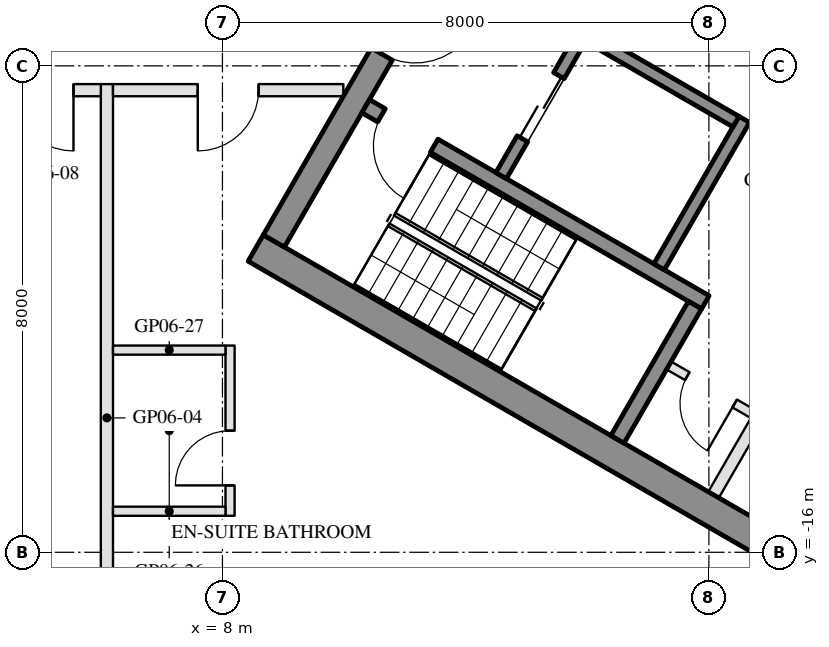
"""IFC4 building model, lengths in metres.
Left out: names, types, materials, properties, quantities, classifications, styles, units other than length and angle.
Written with IfcOpenShell. Run it as: python <this file> out.ifc"""

import sys

from ifc_helpers import new_model, si_unit, direction, frame, frame_2d, origin, place, context, subcontext, project, spatial, rectangle, extrude, element, fill, save


model = new_model("IFC4")
c1 = context("Model", 3, precision=1e-05, world=origin(), true_north=direction((0.0, 1.0)))
c2 = subcontext(c1, "Body", "Model", "MODEL_VIEW")
j1 = project(units=[si_unit("LENGTHUNIT", "METRE"), si_unit("PLANEANGLEUNIT", "RADIAN")], contexts=[c1])
p1 = place(None, origin())
s1 = spatial("IfcSite", under=j1, at=p1, CompositionType="ELEMENT")
p2 = place(p1, origin())
s2 = spatial("IfcBuilding", under=s1, at=p2, CompositionType="ELEMENT")
p3 = place(p2, frame((0.0, 0.0, 90.9)))
s3 = spatial("IfcBuildingStorey", under=s2, at=p3, CompositionType="ELEMENT", Elevation=90.9)
for number, where, z_axis, x_axis in (
    (1, (8.547, -10.997, 0.0), (0.0, 0.0, 1.0), (0.866, -0.5, 0.0)),
    (2, (13.797, -1.903, 0.0), (0.0, 0.0, 1.0), (0.866, -0.5, 0.0)),
):
    element("IfcWall", number, at=place(p3, frame(where, z_axis=z_axis, x_axis=x_axis)), inside=s3, PredefinedType="SHEAR", context=c2, shape_type="SweptSolid", body=[
        extrude(rectangle(XDim=14.837, YDim=0.5, at=frame_2d((7.418, 0.0))), origin(), (0.0, 0.0, 1.0), 3.5),
    ])
p4 = place(p3, frame((8.845, -10.88, 0.0), z_axis=(0.0, 0.0, 1.0), x_axis=(0.500004234368, 0.866022959057, 0.0)))
e3 = element("IfcWall", 3, at=p4, inside=s3, PredefinedType="SHEAR", context=c2, shape_type="SweptSolid", body=[
    extrude(rectangle(XDim=10.0, YDim=0.4, at=frame_2d((5.0, 0.0))), origin(), (0.0, 0.0, 1.0), 3.5),
])
p5 = place(p4, frame((3.55, 0.0, 0.0)))
e4 = element("IfcOpeningElement", 4, at=p5, cuts=e3, PredefinedType="OPENING", context=c2, shape_type="SweptSolid", body=[
    extrude(rectangle(XDim=1.1, YDim=2.1, at=frame_2d((0.55, 1.05))), frame((0.0, 0.21, 0.0), z_axis=(0.0, -1.0, 0.0), x_axis=(1.0, 0.0, 0.0)), (0.0, 0.0, 1.0), 0.42),
])
p6 = place(p4, frame((5.85, 0.0, 0.0)))
e5 = element("IfcOpeningElement", 5, at=p6, cuts=e3, PredefinedType="OPENING", context=c2, shape_type="SweptSolid", body=[
    extrude(rectangle(XDim=1.4, YDim=2.1, at=frame_2d((0.7, 1.05))), frame((0.0, 0.21, 0.0), z_axis=(0.0, -1.0, 0.0), x_axis=(1.0, 0.0, 0.0)), (0.0, 0.0, 1.0), 0.42),
])
p7 = place(p3, frame((10.356, -8.664, 0.0), z_axis=(0.0, 0.0, 1.0), x_axis=(0.866028629588, -0.499994412703, 0.0)))
e6 = element("IfcWall", 6, at=p7, inside=s3, PredefinedType="SHEAR", context=c2, shape_type="SweptSolid", body=[
    extrude(rectangle(XDim=6.45, YDim=0.25, at=frame_2d((3.225, 0.0))), origin(), (0.0, 0.0, 1.0), 3.5),
])
p8 = place(p7, frame((0.3, 0.0, 0.0)))
e7 = element("IfcOpeningElement", 7, at=p8, cuts=e6, PredefinedType="OPENING", context=c2, shape_type="SweptSolid", body=[
    extrude(rectangle(XDim=1.0, YDim=2.1, at=frame_2d((0.5, 1.05))), frame((0.0, 0.135, 0.0), z_axis=(0.0, -1.0, 0.0), x_axis=(1.0, 0.0, 0.0)), (0.0, 0.0, 1.0), 0.27),
])
p9 = place(p3, frame((14.496, -14.143, 0.0), z_axis=(0.0, 0.0, 1.0), x_axis=(0.500062241894, 0.865989465428, 0.0)))
e8 = element("IfcWall", 8, at=p9, inside=s3, PredefinedType="SHEAR", context=c2, shape_type="SweptSolid", body=[
    extrude(rectangle(XDim=2.55, YDim=0.25, at=frame_2d((1.275, 0.0))), origin(), (0.0, 0.0, 1.0), 3.5),
])
p10 = place(p3, frame((15.181, -11.305, 0.0), z_axis=(0.0, 0.0, 1.0), x_axis=(0.49994636267, 0.866056369097, 0.0)))
e9 = element("IfcWall", 9, at=p10, inside=s3, PredefinedType="SHEAR", context=c2, shape_type="SweptSolid", body=[
    extrude(rectangle(XDim=2.8, YDim=0.2, at=frame_2d((1.4, 0.0))), origin(), (0.0, 0.0, 1.0), 3.5),
])
p11 = place(p3, frame((12.583, -9.805, 0.0), z_axis=(0.0, 0.0, 1.0), x_axis=(0.49994636267, 0.866056369097, 0.0)))
e10 = element("IfcWall", 10, at=p11, inside=s3, PredefinedType="SHEAR", context=c2, shape_type="SweptSolid", body=[
    extrude(rectangle(XDim=2.8, YDim=0.2, at=frame_2d((1.4, 0.0))), origin(), (0.0, 0.0, 1.0), 3.5),
])
p12 = place(p11, frame((0.7, 0.0, 0.0)))
e11 = element("IfcOpeningElement", 11, at=p12, cuts=e10, PredefinedType="OPENING", context=c2, shape_type="SweptSolid", body=[
    extrude(rectangle(XDim=1.2, YDim=2.1, at=frame_2d((0.6, 1.05))), frame((0.0, 0.11, 0.0), z_axis=(0.0, -1.0, 0.0), x_axis=(1.0, 0.0, 0.0)), (0.0, 0.0, 1.0), 0.22),
])
p13 = place(p3, frame((14.02, -7.517, 0.0), z_axis=(0.0, 0.0, 1.0), x_axis=(0.866034573852, -0.49998411664, 0.0)))
e12 = element("IfcWall", 12, at=p13, inside=s3, PredefinedType="SHEAR", context=c2, shape_type="SweptSolid", body=[
    extrude(rectangle(XDim=2.8, YDim=0.2, at=frame_2d((1.4, 0.0))), origin(), (0.0, 0.0, 1.0), 3.5),
])
p14 = place(p3, frame((12.968, -4.138, 0.0), z_axis=(0.0, 0.0, 1.0), x_axis=(0.866028328073, -0.49999493495, 0.0)))
e13 = element("IfcWall", 13, at=p14, inside=s3, PredefinedType="SHEAR", context=c2, shape_type="SweptSolid", body=[
    extrude(rectangle(XDim=10.16, YDim=0.2, at=frame_2d((5.08, 0.0))), origin(), (0.0, 0.0, 1.0), 3.5),
])
p15 = place(p14, frame((0.62, 0.0, 0.0)))
e14 = element("IfcOpeningElement", 14, at=p15, cuts=e13, PredefinedType="OPENING", context=c2, shape_type="SweptSolid", body=[
    extrude(rectangle(XDim=1.1, YDim=2.1, at=frame_2d((0.55, 1.05))), frame((0.0, 0.11, 0.0), z_axis=(0.0, -1.0, 0.0), x_axis=(1.0, 0.0, 0.0)), (0.0, 0.0, 1.0), 0.22),
])
p16 = place(p14, frame((3.16, 0.0, 0.0)))
e15 = element("IfcOpeningElement", 15, at=p16, cuts=e13, PredefinedType="OPENING", context=c2, shape_type="SweptSolid", body=[
    extrude(rectangle(XDim=1.1, YDim=2.1, at=frame_2d((0.55, 1.05))), frame((0.0, 0.11, 0.0), z_axis=(0.0, -1.0, 0.0), x_axis=(1.0, 0.0, 0.0)), (0.0, 0.0, 1.0), 0.22),
])
p17 = place(p14, frame((5.7, 0.0, 0.0)))
e16 = element("IfcOpeningElement", 16, at=p17, cuts=e13, PredefinedType="OPENING", context=c2, shape_type="SweptSolid", body=[
    extrude(rectangle(XDim=1.1, YDim=2.1, at=frame_2d((0.55, 1.05))), frame((0.0, 0.11, 0.0), z_axis=(0.0, -1.0, 0.0), x_axis=(1.0, 0.0, 0.0)), (0.0, 0.0, 1.0), 0.22),
])
p18 = place(p14, frame((8.24, 0.0, 0.0)))
e17 = element("IfcOpeningElement", 17, at=p18, cuts=e13, PredefinedType="OPENING", context=c2, shape_type="SweptSolid", body=[
    extrude(rectangle(XDim=1.1, YDim=2.1, at=frame_2d((0.55, 1.05))), frame((0.0, 0.11, 0.0), z_axis=(0.0, -1.0, 0.0), x_axis=(1.0, 0.0, 0.0)), (0.0, 0.0, 1.0), 0.22),
])
p19 = place(p3, frame((16.076, -15.055, 0.0), z_axis=(0.0, 0.0, 1.0), x_axis=(0.499995103361, 0.866028230842, 0.0)))
e18 = element("IfcWall", 18, at=p19, inside=s3, PredefinedType="PARTITIONING", context=c2, shape_type="SweptSolid", body=[
    extrude(rectangle(XDim=5.4, YDim=0.2, at=frame_2d((2.7, 0.0))), origin(), (0.0, 0.0, 1.0), 3.5),
])
p20 = place(p19, frame((1.913, 0.0, 0.0)))
e19 = element("IfcOpeningElement", 19, at=p20, cuts=e18, PredefinedType="OPENING", context=c2, shape_type="SweptSolid", body=[
    extrude(rectangle(XDim=0.9, YDim=2.1, at=frame_2d((0.45, 1.05))), frame((0.0, 0.11, 0.0), z_axis=(0.0, -1.0, 0.0), x_axis=(1.0, 0.0, 0.0)), (0.0, 0.0, 1.0), 0.22),
])
p21 = place(p19, frame((3.788, 0.0, 0.0)))
e20 = element("IfcOpeningElement", 20, at=p21, cuts=e18, PredefinedType="OPENING", context=c2, shape_type="SweptSolid", body=[
    extrude(rectangle(XDim=0.9, YDim=2.1, at=frame_2d((0.45, 1.05))), frame((0.0, 0.11, 0.0), z_axis=(0.0, -1.0, 0.0), x_axis=(1.0, 0.0, 0.0)), (0.0, 0.0, 1.0), 0.22),
])
p22 = place(p3, frame((15.342, -12.928, 0.0), z_axis=(0.0, 0.0, 1.0), x_axis=(0.865989903783, -0.500061482766, 0.0)))
e21 = element("IfcWall", 21, at=p22, inside=s3, PredefinedType="PARTITIONING", context=c2, shape_type="SweptSolid", body=[
    extrude(rectangle(XDim=1.6, YDim=0.15, at=frame_2d((0.8, 0.0))), origin(), (0.0, 0.0, 1.0), 3.5),
])
p23 = place(p22, frame((0.35, 0.0, 0.0)))
e22 = element("IfcOpeningElement", 22, at=p23, cuts=e21, PredefinedType="OPENING", context=c2, shape_type="SweptSolid", body=[
    extrude(rectangle(XDim=0.9, YDim=2.1, at=frame_2d((0.45, 1.05))), frame((0.0, 0.085, 0.0), z_axis=(0.0, -1.0, 0.0), x_axis=(1.0, 0.0, 0.0)), (0.0, 0.0, 1.0), 0.17),
])
p24 = place(p3, frame((6.1, -19.28, 0.0), z_axis=(0.0, 0.0, 1.0), x_axis=(0.0, 1.0, 0.0)))
e23 = element("IfcWall", 23, at=p24, inside=s3, PredefinedType="PARTITIONING", context=c2, shape_type="SweptSolid", body=[
    extrude(rectangle(XDim=10.98, YDim=0.2, at=frame_2d((5.49, 0.0))), origin(), (0.0, 0.0, 1.0), 2.96),
])
p25 = place(p3, frame((6.0, -8.4, 0.0), z_axis=(0.0, 0.0, 1.0), x_axis=(-1.0, 0.0, 0.0)))
e24 = element("IfcWall", 24, at=p25, inside=s3, PredefinedType="PARTITIONING", context=c2, shape_type="SweptSolid", body=[
    extrude(rectangle(XDim=3.906, YDim=0.2, at=frame_2d((1.953, 0.0))), origin(), (0.0, 0.0, 1.0), 2.95),
])
p26 = place(p25, frame((0.45, 0.0, 0.0)))
e25 = element("IfcOpeningElement", 25, at=p26, cuts=e24, PredefinedType="OPENING", context=c2, shape_type="SweptSolid", body=[
    extrude(rectangle(XDim=1.0, YDim=2.1, at=frame_2d((0.5, 1.05))), frame((0.0, 0.11, 0.0), z_axis=(0.0, -1.0, 0.0), x_axis=(1.0, 0.0, 0.0)), (0.0, 0.0, 1.0), 0.22),
])
p27 = place(p3, frame((9.988, -8.4, 0.0), z_axis=(0.0, 0.0, 1.0), x_axis=(-1.0, 0.0, 0.0)))
e26 = element("IfcWall", 26, at=p27, inside=s3, PredefinedType="PARTITIONING", context=c2, shape_type="SweptSolid", body=[
    extrude(rectangle(XDim=3.788, YDim=0.2, at=frame_2d((1.894, 0.0))), origin(), (0.0, 0.0, 1.0), 2.95),
])
p28 = place(p27, frame((1.394, 0.0, 0.0)))
e27 = element("IfcOpeningElement", 27, at=p28, cuts=e26, PredefinedType="OPENING", context=c2, shape_type="SweptSolid", body=[
    extrude(rectangle(XDim=1.0, YDim=2.1, at=frame_2d((0.5, 1.05))), frame((0.0, 0.11, 0.0), z_axis=(0.0, -1.0, 0.0), x_axis=(1.0, 0.0, 0.0)), (0.0, 0.0, 1.0), 0.22),
])
p29 = place(p3, frame((8.125, -15.4, 0.0), z_axis=(0.0, 0.0, 1.0), x_axis=(0.0, 1.0, 0.0)))
e28 = element("IfcWall", 28, at=p29, inside=s3, PredefinedType="PARTITIONING", context=c2, shape_type="SweptSolid", body=[
    extrude(rectangle(XDim=2.8, YDim=0.15, at=frame_2d((1.4, 0.0))), origin(), (0.0, 0.0, 1.0), 3.55),
])
p30 = place(p29, frame((0.5, 0.0, 0.0)))
e29 = element("IfcOpeningElement", 29, at=p30, cuts=e28, PredefinedType="OPENING", context=c2, shape_type="SweptSolid", body=[
    extrude(rectangle(XDim=0.9, YDim=2.1, at=frame_2d((0.45, 1.05))), frame((0.0, 0.085, 0.0), z_axis=(0.0, -1.0, 0.0), x_axis=(1.0, 0.0, 0.0)), (0.0, 0.0, 1.0), 0.17),
])
for number, where, z_axis, x_axis in (
    (30, (6.2, -15.325, 0.0), (0.0, 0.0, 1.0), (1.0, 0.0, 0.0)),
    (31, (6.2, -12.675, 0.0), (0.0, 0.0, 1.0), (1.0, 0.0, 0.0)),
):
    element("IfcWall", number, at=place(p3, frame(where, z_axis=z_axis, x_axis=x_axis)), inside=s3, PredefinedType="PARTITIONING", context=c2, shape_type="SweptSolid", body=[
        extrude(rectangle(XDim=1.85, YDim=0.15, at=frame_2d((0.925, 0.0))), origin(), (0.0, 0.0, 1.0), 2.95),
    ])
p31 = place(p12, origin())
e32 = element("IfcDoor", 32, at=p31, inside=s3, OperationType="DOUBLE_DOOR_SLIDING", PredefinedType="DOOR", context=c2, shape_type="SweptSolid", body=[
    extrude(rectangle(XDim=1.2, YDim=2.1, at=frame_2d((0.6, 1.05))), frame((0.0, 0.025, 0.0), z_axis=(0.0, -1.0, 0.0), x_axis=(1.0, 0.0, 0.0)), (0.0, 0.0, 1.0), 0.05),
])
fill(e11, e32)
p32 = place(p23, frame((0.9, 0.0, 0.0), z_axis=(0.0, 0.0, 1.0), x_axis=(-1.0, 0.0, 0.0)))
e33 = element("IfcDoor", 33, at=p32, inside=s3, OperationType="SINGLE_SWING_LEFT", PredefinedType="DOOR", context=c2, shape_type="SweptSolid", body=[
    extrude(rectangle(XDim=0.9, YDim=2.1, at=frame_2d((0.45, 1.05))), frame((0.0, 0.025, 0.0), z_axis=(0.0, -1.0, 0.0), x_axis=(1.0, 0.0, 0.0)), (0.0, 0.0, 1.0), 0.05),
])
fill(e22, e33)
p33 = place(p5, frame((1.1, 0.0, 0.0), z_axis=(0.0, 0.0, 1.0), x_axis=(-1.0, 0.0, 0.0)))
e34 = element("IfcDoor", 34, at=p33, inside=s3, OperationType="SINGLE_SWING_LEFT", PredefinedType="DOOR", context=c2, shape_type="SweptSolid", body=[
    extrude(rectangle(XDim=1.1, YDim=2.1, at=frame_2d((0.55, 1.05))), frame((0.0, 0.025, 0.0), z_axis=(0.0, -1.0, 0.0), x_axis=(1.0, 0.0, 0.0)), (0.0, 0.0, 1.0), 0.05),
])
fill(e4, e34)
p34 = place(p8, frame((1.0, 0.0, 0.0), z_axis=(0.0, 0.0, 1.0), x_axis=(-1.0, 0.0, 0.0)))
e35 = element("IfcDoor", 35, at=p34, inside=s3, OperationType="SINGLE_SWING_LEFT", PredefinedType="DOOR", context=c2, shape_type="SweptSolid", body=[
    extrude(rectangle(XDim=1.0, YDim=2.1, at=frame_2d((0.5, 1.05))), frame((0.0, 0.025, 0.0), z_axis=(0.0, -1.0, 0.0), x_axis=(1.0, 0.0, 0.0)), (0.0, 0.0, 1.0), 0.05),
])
fill(e7, e35)
p35 = place(p26, origin())
e36 = element("IfcDoor", 36, at=p35, inside=s3, OperationType="SINGLE_SWING_LEFT", PredefinedType="DOOR", context=c2, shape_type="SweptSolid", body=[
    extrude(rectangle(XDim=1.0, YDim=2.1, at=frame_2d((0.5, 1.05))), frame((0.0, 0.025, 0.0), z_axis=(0.0, -1.0, 0.0), x_axis=(1.0, 0.0, 0.0)), (0.0, 0.0, 1.0), 0.05),
])
fill(e25, e36)
p36 = place(p30, origin())
e37 = element("IfcDoor", 37, at=p36, inside=s3, OperationType="SINGLE_SWING_LEFT", PredefinedType="DOOR", context=c2, shape_type="SweptSolid", body=[
    extrude(rectangle(XDim=0.9, YDim=2.1, at=frame_2d((0.45, 1.05))), frame((0.0, 0.025, 0.0), z_axis=(0.0, -1.0, 0.0), x_axis=(1.0, 0.0, 0.0)), (0.0, 0.0, 1.0), 0.05),
])
fill(e29, e37)
p37 = place(p28, origin())
e38 = element("IfcDoor", 38, at=p37, inside=s3, OperationType="SINGLE_SWING_RIGHT", PredefinedType="DOOR", context=c2, shape_type="SweptSolid", body=[
    extrude(rectangle(XDim=1.0, YDim=2.1, at=frame_2d((0.5, 1.05))), frame((0.0, 0.025, 0.0), z_axis=(0.0, -1.0, 0.0), x_axis=(1.0, 0.0, 0.0)), (0.0, 0.0, 1.0), 0.05),
])
fill(e27, e38)
save(model, sys.argv[1])
